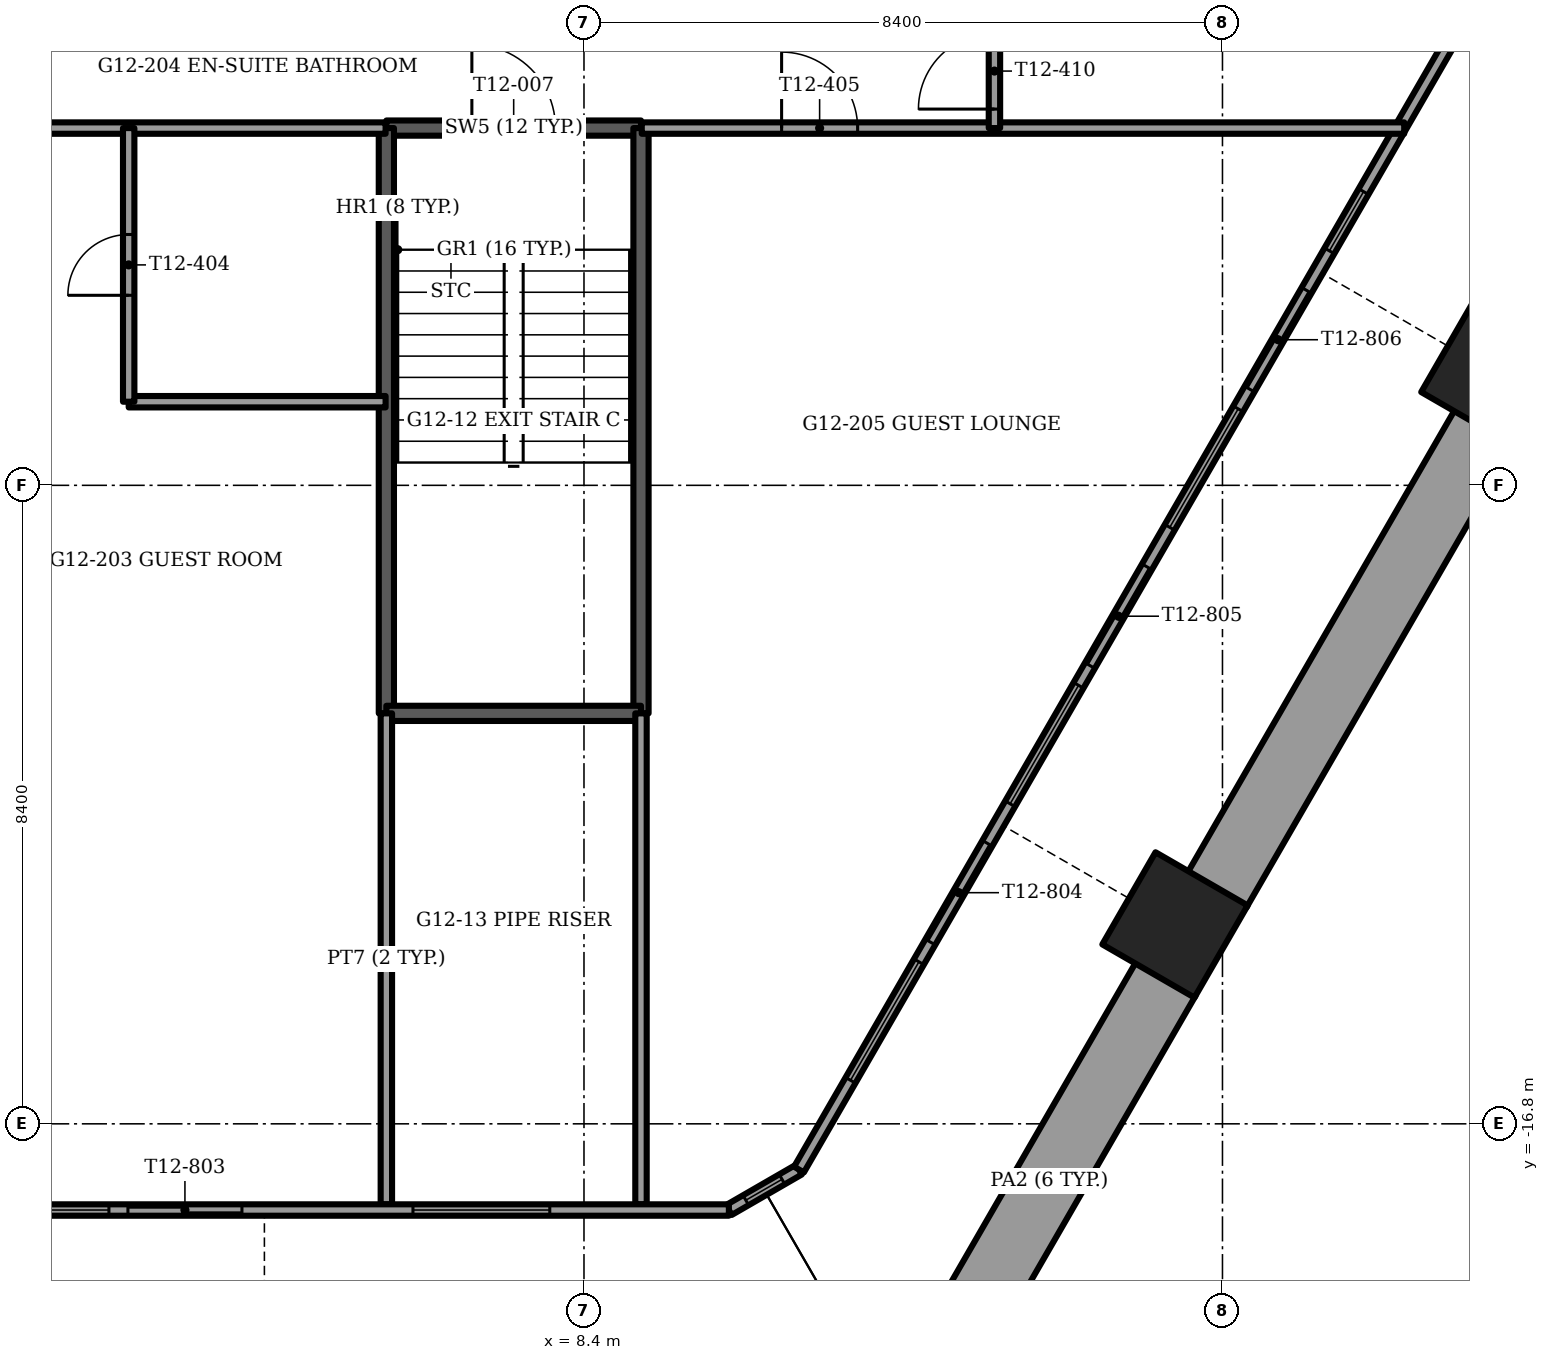
"""IFC4 building model, lengths in metres.
Left out: names, types, materials, properties, quantities, classifications, styles, units other than length and angle.
Written with IfcOpenShell. Run it as: python <this file> out.ifc"""

import sys

from ifc_helpers import new_model, si_unit, direction, frame, frame_2d, origin, origin_2d, place, context, subcontext, project, spatial, rectangle, extrude, element, fill, save


model = new_model("IFC4")
c1 = context("Model", 3, precision=1e-05, world=origin(), true_north=direction((0.0, 1.0)))
c2 = subcontext(c1, "Body", "Model", "MODEL_VIEW")
j1 = project(units=[si_unit("LENGTHUNIT", "METRE"), si_unit("PLANEANGLEUNIT", "RADIAN")], contexts=[c1])
p1 = place(None, origin())
s1 = spatial("IfcSite", under=j1, at=p1, CompositionType="ELEMENT")
p2 = place(p1, origin())
s2 = spatial("IfcBuilding", under=s1, at=p2, CompositionType="ELEMENT")
p3 = place(p2, frame((0.0, 0.0, 50.5)))
s3 = spatial("IfcBuildingStorey", under=s2, at=p3, CompositionType="ELEMENT", Elevation=50.5)
for number, where, z_axis, x_axis in (
    (1, (16.175, -14.183, -1.2), (0.0, 0.0, 1.0), (-0.5, -0.866, 0.0)),
    (2, (20.371, -6.917, -1.2), (0.0, 0.0, 1.0), (-0.5, -0.866, 0.0)),
):
    element("IfcColumn", number, at=place(p3, frame(where, z_axis=z_axis, x_axis=x_axis)), inside=s3, PredefinedType="COLUMN", context=c2, shape_type="SweptSolid", body=[
        extrude(rectangle(XDim=1.4, YDim=1.4, at=origin_2d()), origin(), (0.0, 0.0, 1.0), 3.75),
    ])
p4 = place(p3, frame((12.989, -20.203, 0.0), z_axis=(0.0, 0.0, 1.0), x_axis=(0.500007141444, 0.86602128063, 0.0)))
e3 = element("IfcWall", 3, at=p4, inside=s3, PredefinedType="PARAPET", context=c2, shape_type="SweptSolid", body=[
    extrude(rectangle(XDim=6.137, YDim=0.9, at=frame_2d((3.068, 0.0))), origin(), (0.0, 0.0, 1.0), 1.1),
])
p5 = place(p3, frame((16.727, -13.728, 0.0), z_axis=(0.0, 0.0, 1.0), x_axis=(0.499997206141, 0.866027016814, 0.0)))
e4 = element("IfcWall", 4, at=p5, inside=s3, PredefinedType="PARAPET", context=c2, shape_type="SweptSolid", body=[
    extrude(rectangle(XDim=7.051, YDim=0.9, at=frame_2d((3.525, 0.0))), origin(), (0.0, 0.0, 1.0), 1.1),
])
p6 = place(p3, frame((-10.306, -17.934, 0.0), z_axis=(0.0, 0.0, 1.0), x_axis=(1.0, 0.0, 0.0)))
e5 = element("IfcWall", 5, at=p6, inside=s3, PredefinedType="SOLIDWALL", context=c2, shape_type="SweptSolid", body=[
    extrude(rectangle(XDim=20.613, YDim=0.15, at=frame_2d((10.306, 0.0))), origin(), (0.0, 0.0, 1.0), 3.45),
])
p7 = place(p6, frame((4.856, 0.0, 0.15)))
e6 = element("IfcOpeningElement", 6, at=p7, cuts=e5, PredefinedType="OPENING", context=c2, shape_type="SweptSolid", body=[
    extrude(rectangle(XDim=0.9, YDim=2.85, at=frame_2d((0.45, 1.425))), frame((0.0, 0.075, 0.0), z_axis=(0.0, -1.0, 0.0), x_axis=(1.0, 0.0, 0.0)), (0.0, 0.0, 1.0), 0.15),
])
p8 = place(p6, frame((2.656, 0.0, 0.15)))
e7 = element("IfcOpeningElement", 7, at=p8, cuts=e5, PredefinedType="OPENING", context=c2, shape_type="SweptSolid", body=[
    extrude(rectangle(XDim=1.5, YDim=2.85, at=frame_2d((0.75, 1.425))), frame((0.0, 0.075, 0.0), z_axis=(0.0, -1.0, 0.0), x_axis=(1.0, 0.0, 0.0)), (0.0, 0.0, 1.0), 0.15),
])
p9 = place(p6, frame((6.406, 0.0, 0.15)))
e8 = element("IfcOpeningElement", 8, at=p9, cuts=e5, PredefinedType="OPENING", context=c2, shape_type="SweptSolid", body=[
    extrude(rectangle(XDim=1.8, YDim=2.85, at=frame_2d((0.9, 1.425))), frame((0.0, 0.075, 0.0), z_axis=(0.0, -1.0, 0.0), x_axis=(1.0, 0.0, 0.0)), (0.0, 0.0, 1.0), 0.15),
])
p10 = place(p6, frame((8.456, 0.0, 0.15)))
e9 = element("IfcOpeningElement", 9, at=p10, cuts=e5, PredefinedType="OPENING", context=c2, shape_type="SweptSolid", body=[
    extrude(rectangle(XDim=1.5, YDim=2.85, at=frame_2d((0.75, 1.425))), frame((0.0, 0.075, 0.0), z_axis=(0.0, -1.0, 0.0), x_axis=(1.0, 0.0, 0.0)), (0.0, 0.0, 1.0), 0.15),
])
p11 = place(p6, frame((10.656, 0.0, 0.15)))
e10 = element("IfcOpeningElement", 10, at=p11, cuts=e5, PredefinedType="OPENING", context=c2, shape_type="SweptSolid", body=[
    extrude(rectangle(XDim=1.8, YDim=2.85, at=frame_2d((0.9, 1.425))), frame((0.0, 0.075, 0.0), z_axis=(0.0, -1.0, 0.0), x_axis=(1.0, 0.0, 0.0)), (0.0, 0.0, 1.0), 0.15),
])
p12 = place(p6, frame((12.706, 0.0, 0.0)))
e11 = element("IfcOpeningElement", 11, at=p12, cuts=e5, PredefinedType="OPENING", context=c2, shape_type="SweptSolid", body=[
    extrude(rectangle(XDim=1.5, YDim=2.4, at=frame_2d((0.75, 1.2))), frame((0.0, 0.075, 0.0), z_axis=(0.0, -1.0, 0.0), x_axis=(1.0, 0.0, 0.0)), (0.0, 0.0, 1.0), 0.15),
])
p13 = place(p6, frame((16.456, 0.0, 0.15)))
e12 = element("IfcOpeningElement", 12, at=p13, cuts=e5, PredefinedType="OPENING", context=c2, shape_type="SweptSolid", body=[
    extrude(rectangle(XDim=1.8, YDim=2.85, at=frame_2d((0.9, 1.425))), frame((0.0, 0.075, 0.0), z_axis=(0.0, -1.0, 0.0), x_axis=(1.0, 0.0, 0.0)), (0.0, 0.0, 1.0), 0.15),
])
p14 = place(p3, frame((11.229, -17.402, 0.0), z_axis=(0.0, 0.0, 1.0), x_axis=(0.500004426522, 0.866022848116, 0.0)))
e13 = element("IfcWall", 13, at=p14, inside=s3, PredefinedType="SOLIDWALL", context=c2, shape_type="SweptSolid", body=[
    extrude(rectangle(XDim=18.912, YDim=0.15, at=frame_2d((9.456, 0.0))), origin(), (0.0, 0.0, 1.0), 3.45),
])
p15 = place(p14, frame((1.356, 0.0, 0.15)))
e14 = element("IfcOpeningElement", 14, at=p15, cuts=e13, PredefinedType="OPENING", context=c2, shape_type="SweptSolid", body=[
    extrude(rectangle(XDim=1.8, YDim=2.85, at=frame_2d((0.9, 1.425))), frame((0.0, 0.075, 0.0), z_axis=(0.0, -1.0, 0.0), x_axis=(1.0, 0.0, 0.0)), (0.0, 0.0, 1.0), 0.15),
])
p16 = place(p14, frame((3.456, 0.0, 0.0)))
e15 = element("IfcOpeningElement", 15, at=p16, cuts=e13, PredefinedType="OPENING", context=c2, shape_type="SweptSolid", body=[
    extrude(rectangle(XDim=1.5, YDim=2.4, at=frame_2d((0.75, 1.2))), frame((0.0, 0.075, 0.0), z_axis=(0.0, -1.0, 0.0), x_axis=(1.0, 0.0, 0.0)), (0.0, 0.0, 1.0), 0.15),
])
p17 = place(p14, frame((5.556, 0.0, 0.15)))
e16 = element("IfcOpeningElement", 16, at=p17, cuts=e13, PredefinedType="OPENING", context=c2, shape_type="SweptSolid", body=[
    extrude(rectangle(XDim=1.8, YDim=2.85, at=frame_2d((0.9, 1.425))), frame((0.0, 0.075, 0.0), z_axis=(0.0, -1.0, 0.0), x_axis=(1.0, 0.0, 0.0)), (0.0, 0.0, 1.0), 0.15),
])
p18 = place(p14, frame((7.656, 0.0, 0.0)))
e17 = element("IfcOpeningElement", 17, at=p18, cuts=e13, PredefinedType="OPENING", context=c2, shape_type="SweptSolid", body=[
    extrude(rectangle(XDim=1.5, YDim=2.4, at=frame_2d((0.75, 1.2))), frame((0.0, 0.075, 0.0), z_axis=(0.0, -1.0, 0.0), x_axis=(1.0, 0.0, 0.0)), (0.0, 0.0, 1.0), 0.15),
])
p19 = place(p14, frame((9.756, 0.0, 0.15)))
e18 = element("IfcOpeningElement", 18, at=p19, cuts=e13, PredefinedType="OPENING", context=c2, shape_type="SweptSolid", body=[
    extrude(rectangle(XDim=1.8, YDim=2.85, at=frame_2d((0.9, 1.425))), frame((0.0, 0.075, 0.0), z_axis=(0.0, -1.0, 0.0), x_axis=(1.0, 0.0, 0.0)), (0.0, 0.0, 1.0), 0.15),
])
p20 = place(p14, frame((11.856, 0.0, 0.0)))
e19 = element("IfcOpeningElement", 19, at=p20, cuts=e13, PredefinedType="OPENING", context=c2, shape_type="SweptSolid", body=[
    extrude(rectangle(XDim=1.5, YDim=2.4, at=frame_2d((0.75, 1.2))), frame((0.0, 0.075, 0.0), z_axis=(0.0, -1.0, 0.0), x_axis=(1.0, 0.0, 0.0)), (0.0, 0.0, 1.0), 0.15),
])
p21 = place(p14, frame((13.956, 0.0, 0.15)))
e20 = element("IfcOpeningElement", 20, at=p21, cuts=e13, PredefinedType="OPENING", context=c2, shape_type="SweptSolid", body=[
    extrude(rectangle(XDim=0.9, YDim=2.85, at=frame_2d((0.45, 1.425))), frame((0.0, 0.075, 0.0), z_axis=(0.0, -1.0, 0.0), x_axis=(1.0, 0.0, 0.0)), (0.0, 0.0, 1.0), 0.15),
])
p22 = place(p3, frame((10.306, -17.934, 0.0), z_axis=(0.0, 0.0, 1.0), x_axis=(0.865990848561, 0.500059846627, 0.0)))
e21 = element("IfcWall", 21, at=p22, inside=s3, PredefinedType="SOLIDWALL", context=c2, shape_type="SweptSolid", body=[
    extrude(rectangle(XDim=1.065, YDim=0.15, at=frame_2d((0.532, 0.0))), origin(), (0.0, 0.0, 1.0), 3.45),
])
p23 = place(p22, frame((0.258, 0.0, 0.15)))
e22 = element("IfcOpeningElement", 22, at=p23, cuts=e21, PredefinedType="OPENING", context=c2, shape_type="SweptSolid", body=[
    extrude(rectangle(XDim=0.55, YDim=2.85, at=frame_2d((0.275, 1.425))), frame((0.0, 0.075, 0.0), z_axis=(0.0, -1.0, 0.0), x_axis=(1.0, 0.0, 0.0)), (0.0, 0.0, 1.0), 0.15),
])
p24 = place(p3, frame((5.8, -3.7, -0.3), z_axis=(0.0, 0.0, 1.0), x_axis=(1.0, 0.0, 0.0)))
e23 = element("IfcWall", 23, at=p24, inside=s3, PredefinedType="SOLIDWALL", context=c2, shape_type="SweptSolid", body=[
    extrude(rectangle(XDim=3.35, YDim=0.2, at=frame_2d((1.675, 0.0))), origin(), (0.0, 0.0, 1.0), 3.75),
])
p25 = place(p24, frame((1.125, 0.0, 0.0)))
e24 = element("IfcOpeningElement", 24, at=p25, cuts=e23, PredefinedType="OPENING", context=c2, shape_type="SweptSolid", body=[
    extrude(rectangle(XDim=1.1, YDim=2.1, at=frame_2d((0.55, 1.05))), frame((0.0, 0.1, 0.0), z_axis=(0.0, -1.0, 0.0), x_axis=(1.0, 0.0, 0.0)), (0.0, 0.0, 1.0), 0.2),
])
for number, where, z_axis, x_axis in (
    (25, (5.8, -3.7, -0.3), (0.0, 0.0, 1.0), (0.0, -1.0, 0.0)),
    (26, (9.15, -3.7, -0.3), (0.0, 0.0, 1.0), (0.0, -1.0, 0.0)),
):
    element("IfcWall", number, at=place(p3, frame(where, z_axis=z_axis, x_axis=x_axis)), inside=s3, PredefinedType="SOLIDWALL", context=c2, shape_type="SweptSolid", body=[
        extrude(rectangle(XDim=7.7, YDim=0.2, at=frame_2d((3.85, 0.0))), origin(), (0.0, 0.0, 1.0), 3.75),
    ])
p26 = place(p3, frame((5.8, -11.4, -0.3), z_axis=(0.0, 0.0, 1.0), x_axis=(1.0, 0.0, 0.0)))
e27 = element("IfcWall", 27, at=p26, inside=s3, PredefinedType="SOLIDWALL", context=c2, shape_type="SweptSolid", body=[
    extrude(rectangle(XDim=3.35, YDim=0.2, at=frame_2d((1.675, 0.0))), origin(), (0.0, 0.0, 1.0), 3.75),
])
for number, where, z_axis, x_axis in (
    (28, (5.8, -11.4, 0.0), (0.0, 0.0, 1.0), (0.0, -1.0, 0.0)),
    (29, (9.15, -11.4, 0.0), (0.0, 0.0, 1.0), (0.0, -1.0, 0.0)),
):
    element("IfcWall", number, at=place(p3, frame(where, z_axis=z_axis, x_axis=x_axis)), inside=s3, PredefinedType="PARTITIONING", context=c2, shape_type="SweptSolid", body=[
        extrude(rectangle(XDim=6.459, YDim=0.15, at=frame_2d((3.229, 0.0))), origin(), (0.0, 0.0, 1.0), 3.45),
    ])
p27 = place(p3, frame((2.41, -7.3, 0.0), z_axis=(0.0, 0.0, 1.0), x_axis=(1.0, 0.0, 0.0)))
e30 = element("IfcWall", 30, at=p27, inside=s3, PredefinedType="PARTITIONING", context=c2, shape_type="SweptSolid", body=[
    extrude(rectangle(XDim=3.38, YDim=0.15, at=frame_2d((1.69, 0.0))), origin(), (0.0, 0.0, 1.0), 3.45),
])
p28 = place(p3, frame((-5.79, -3.7, 0.0), z_axis=(0.0, 0.0, 1.0), x_axis=(1.0, 0.0, 0.0)))
e31 = element("IfcWall", 31, at=p28, inside=s3, PredefinedType="PARTITIONING", context=c2, shape_type="SweptSolid", body=[
    extrude(rectangle(XDim=11.58, YDim=0.15, at=frame_2d((5.79, 0.0))), origin(), (0.0, 0.0, 1.0), 3.45),
])
p29 = place(p28, frame((2.39, 0.0, 0.0)))
e32 = element("IfcOpeningElement", 32, at=p29, cuts=e31, PredefinedType="OPENING", context=c2, shape_type="SweptSolid", body=[
    extrude(rectangle(XDim=1.0, YDim=2.1, at=frame_2d((0.5, 1.05))), frame((0.0, 0.075, 0.0), z_axis=(0.0, -1.0, 0.0), x_axis=(1.0, 0.0, 0.0)), (0.0, 0.0, 1.0), 0.15),
])
p30 = place(p28, frame((6.04, 0.0, 0.0)))
e33 = element("IfcOpeningElement", 33, at=p30, cuts=e31, PredefinedType="OPENING", context=c2, shape_type="SweptSolid", body=[
    extrude(rectangle(XDim=1.0, YDim=2.1, at=frame_2d((0.5, 1.05))), frame((0.0, 0.075, 0.0), z_axis=(0.0, -1.0, 0.0), x_axis=(1.0, 0.0, 0.0)), (0.0, 0.0, 1.0), 0.15),
])
p31 = place(p3, frame((9.16, -3.7, 0.0), z_axis=(0.0, 0.0, 1.0), x_axis=(1.0, 0.0, 0.0)))
e34 = element("IfcWall", 34, at=p31, inside=s3, PredefinedType="PARTITIONING", context=c2, shape_type="SweptSolid", body=[
    extrude(rectangle(XDim=10.031, YDim=0.15, at=frame_2d((5.016, 0.0))), origin(), (0.0, 0.0, 1.0), 3.45),
])
p32 = place(p31, frame((1.84, 0.0, 0.0)))
e35 = element("IfcOpeningElement", 35, at=p32, cuts=e34, PredefinedType="OPENING", context=c2, shape_type="SweptSolid", body=[
    extrude(rectangle(XDim=1.0, YDim=2.1, at=frame_2d((0.5, 1.05))), frame((0.0, 0.075, 0.0), z_axis=(0.0, -1.0, 0.0), x_axis=(1.0, 0.0, 0.0)), (0.0, 0.0, 1.0), 0.15),
])
p33 = place(p3, frame((13.8, -3.7, 0.0), z_axis=(0.0, 0.0, 1.0), x_axis=(0.0, 1.0, 0.0)))
e36 = element("IfcWall", 36, at=p33, inside=s3, PredefinedType="PARTITIONING", context=c2, shape_type="SweptSolid", body=[
    extrude(rectangle(XDim=15.756, YDim=0.15, at=frame_2d((7.878, 0.0))), origin(), (0.0, 0.0, 1.0), 3.45),
])
p34 = place(p33, frame((0.25, 0.0, 0.0)))
e37 = element("IfcOpeningElement", 37, at=p34, cuts=e36, PredefinedType="OPENING", context=c2, shape_type="SweptSolid", body=[
    extrude(rectangle(XDim=1.0, YDim=2.1, at=frame_2d((0.5, 1.05))), frame((0.0, 0.075, 0.0), z_axis=(0.0, -1.0, 0.0), x_axis=(1.0, 0.0, 0.0)), (0.0, 0.0, 1.0), 0.15),
])
p35 = place(p33, frame((5.275, 0.0, 0.0)))
e38 = element("IfcOpeningElement", 38, at=p35, cuts=e36, PredefinedType="OPENING", context=c2, shape_type="SweptSolid", body=[
    extrude(rectangle(XDim=1.0, YDim=2.1, at=frame_2d((0.5, 1.05))), frame((0.0, 0.075, 0.0), z_axis=(0.0, -1.0, 0.0), x_axis=(1.0, 0.0, 0.0)), (0.0, 0.0, 1.0), 0.15),
])
p36 = place(p33, frame((10.933, 0.0, 0.0)))
e39 = element("IfcOpeningElement", 39, at=p36, cuts=e36, PredefinedType="OPENING", context=c2, shape_type="SweptSolid", body=[
    extrude(rectangle(XDim=1.0, YDim=2.1, at=frame_2d((0.5, 1.05))), frame((0.0, 0.075, 0.0), z_axis=(0.0, -1.0, 0.0), x_axis=(1.0, 0.0, 0.0)), (0.0, 0.0, 1.0), 0.15),
])
p37 = place(p3, frame((2.41, -7.3, 0.0), z_axis=(0.0, 0.0, 1.0), x_axis=(0.0, 1.0, 0.0)))
e40 = element("IfcWall", 40, at=p37, inside=s3, PredefinedType="PARTITIONING", context=c2, shape_type="SweptSolid", body=[
    extrude(rectangle(XDim=3.6, YDim=0.15, at=frame_2d((1.8, 0.0))), origin(), (0.0, 0.0, 1.0), 3.45),
])
p38 = place(p37, frame((1.4, 0.0, 0.0)))
e41 = element("IfcOpeningElement", 41, at=p38, cuts=e40, PredefinedType="OPENING", context=c2, shape_type="SweptSolid", body=[
    extrude(rectangle(XDim=0.8, YDim=2.1, at=frame_2d((0.4, 1.05))), frame((0.0, 0.075, 0.0), z_axis=(0.0, -1.0, 0.0), x_axis=(1.0, 0.0, 0.0)), (0.0, 0.0, 1.0), 0.15),
])
p39 = place(p11, origin())
e42 = element("IfcWindow", 42, at=p39, inside=s3, PartitioningType="SINGLE_PANEL", PredefinedType="WINDOW", context=c2, shape_type="SweptSolid", body=[
    extrude(rectangle(XDim=1.8, YDim=2.85, at=frame_2d((0.9, 1.425))), frame((0.0, 0.03, 0.0), z_axis=(0.0, -1.0, 0.0), x_axis=(1.0, 0.0, 0.0)), (0.0, 0.0, 1.0), 0.06),
])
fill(e10, e42)
p40 = place(p12, origin())
e43 = element("IfcDoor", 43, at=p40, inside=s3, OperationType="SLIDING_TO_LEFT", PredefinedType="DOOR", context=c2, shape_type="SweptSolid", body=[
    extrude(rectangle(XDim=1.5, YDim=2.4, at=frame_2d((0.75, 1.2))), frame((0.0, 0.025, 0.0), z_axis=(0.0, -1.0, 0.0), x_axis=(1.0, 0.0, 0.0)), (0.0, 0.0, 1.0), 0.05),
])
fill(e11, e43)
p41 = place(p13, origin())
e44 = element("IfcWindow", 44, at=p41, inside=s3, PartitioningType="SINGLE_PANEL", PredefinedType="WINDOW", context=c2, shape_type="SweptSolid", body=[
    extrude(rectangle(XDim=1.8, YDim=2.85, at=frame_2d((0.9, 1.425))), frame((0.0, 0.03, 0.0), z_axis=(0.0, -1.0, 0.0), x_axis=(1.0, 0.0, 0.0)), (0.0, 0.0, 1.0), 0.06),
])
fill(e12, e44)
p42 = place(p15, origin())
e45 = element("IfcWindow", 45, at=p42, inside=s3, PartitioningType="SINGLE_PANEL", PredefinedType="WINDOW", context=c2, shape_type="SweptSolid", body=[
    extrude(rectangle(XDim=1.8, YDim=2.85, at=frame_2d((0.9, 1.425))), frame((0.0, 0.03, 0.0), z_axis=(0.0, -1.0, 0.0), x_axis=(1.0, 0.0, 0.0)), (0.0, 0.0, 1.0), 0.06),
])
fill(e14, e45)
p43 = place(p16, origin())
e46 = element("IfcDoor", 46, at=p43, inside=s3, OperationType="SLIDING_TO_LEFT", PredefinedType="DOOR", context=c2, shape_type="SweptSolid", body=[
    extrude(rectangle(XDim=1.5, YDim=2.4, at=frame_2d((0.75, 1.2))), frame((0.0, 0.025, 0.0), z_axis=(0.0, -1.0, 0.0), x_axis=(1.0, 0.0, 0.0)), (0.0, 0.0, 1.0), 0.05),
])
fill(e15, e46)
p44 = place(p17, origin())
e47 = element("IfcWindow", 47, at=p44, inside=s3, PartitioningType="SINGLE_PANEL", PredefinedType="WINDOW", context=c2, shape_type="SweptSolid", body=[
    extrude(rectangle(XDim=1.8, YDim=2.85, at=frame_2d((0.9, 1.425))), frame((0.0, 0.03, 0.0), z_axis=(0.0, -1.0, 0.0), x_axis=(1.0, 0.0, 0.0)), (0.0, 0.0, 1.0), 0.06),
])
fill(e16, e47)
p45 = place(p18, origin())
e48 = element("IfcDoor", 48, at=p45, inside=s3, OperationType="SLIDING_TO_RIGHT", PredefinedType="DOOR", context=c2, shape_type="SweptSolid", body=[
    extrude(rectangle(XDim=1.5, YDim=2.4, at=frame_2d((0.75, 1.2))), frame((0.0, 0.025, 0.0), z_axis=(0.0, -1.0, 0.0), x_axis=(1.0, 0.0, 0.0)), (0.0, 0.0, 1.0), 0.05),
])
fill(e17, e48)
p46 = place(p19, origin())
e49 = element("IfcWindow", 49, at=p46, inside=s3, PartitioningType="SINGLE_PANEL", PredefinedType="WINDOW", context=c2, shape_type="SweptSolid", body=[
    extrude(rectangle(XDim=1.8, YDim=2.85, at=frame_2d((0.9, 1.425))), frame((0.0, 0.03, 0.0), z_axis=(0.0, -1.0, 0.0), x_axis=(1.0, 0.0, 0.0)), (0.0, 0.0, 1.0), 0.06),
])
fill(e18, e49)
p47 = place(p20, origin())
e50 = element("IfcDoor", 50, at=p47, inside=s3, OperationType="SLIDING_TO_LEFT", PredefinedType="DOOR", context=c2, shape_type="SweptSolid", body=[
    extrude(rectangle(XDim=1.5, YDim=2.4, at=frame_2d((0.75, 1.2))), frame((0.0, 0.025, 0.0), z_axis=(0.0, -1.0, 0.0), x_axis=(1.0, 0.0, 0.0)), (0.0, 0.0, 1.0), 0.05),
])
fill(e19, e50)
p48 = place(p21, origin())
e51 = element("IfcWindow", 51, at=p48, inside=s3, PartitioningType="SINGLE_PANEL", PredefinedType="WINDOW", context=c2, shape_type="SweptSolid", body=[
    extrude(rectangle(XDim=0.9, YDim=2.85, at=frame_2d((0.45, 1.425))), frame((0.0, 0.03, 0.0), z_axis=(0.0, -1.0, 0.0), x_axis=(1.0, 0.0, 0.0)), (0.0, 0.0, 1.0), 0.06),
])
fill(e20, e51)
p49 = place(p23, origin())
e52 = element("IfcWindow", 52, at=p49, inside=s3, PartitioningType="SINGLE_PANEL", PredefinedType="WINDOW", context=c2, shape_type="SweptSolid", body=[
    extrude(rectangle(XDim=0.55, YDim=2.85, at=frame_2d((0.275, 1.425))), frame((0.0, 0.03, 0.0), z_axis=(0.0, -1.0, 0.0), x_axis=(1.0, 0.0, 0.0)), (0.0, 0.0, 1.0), 0.06),
])
fill(e22, e52)
p50 = place(p25, origin())
e53 = element("IfcDoor", 53, at=p50, inside=s3, OperationType="SINGLE_SWING_LEFT", PredefinedType="DOOR", context=c2, shape_type="SweptSolid", body=[
    extrude(rectangle(XDim=1.1, YDim=2.1, at=frame_2d((0.55, 1.05))), frame((0.0, 0.025, 0.0), z_axis=(0.0, -1.0, 0.0), x_axis=(1.0, 0.0, 0.0)), (0.0, 0.0, 1.0), 0.05),
])
fill(e24, e53)
p51 = place(p38, origin())
e54 = element("IfcDoor", 54, at=p51, inside=s3, OperationType="SINGLE_SWING_RIGHT", PredefinedType="DOOR", context=c2, shape_type="SweptSolid", body=[
    extrude(rectangle(XDim=0.8, YDim=2.1, at=frame_2d((0.4, 1.05))), frame((0.0, 0.025, 0.0), z_axis=(0.0, -1.0, 0.0), x_axis=(1.0, 0.0, 0.0)), (0.0, 0.0, 1.0), 0.05),
])
fill(e41, e54)
p52 = place(p32, origin())
e55 = element("IfcDoor", 55, at=p52, inside=s3, OperationType="SINGLE_SWING_LEFT", PredefinedType="DOOR", context=c2, shape_type="SweptSolid", body=[
    extrude(rectangle(XDim=1.0, YDim=2.1, at=frame_2d((0.5, 1.05))), frame((0.0, 0.025, 0.0), z_axis=(0.0, -1.0, 0.0), x_axis=(1.0, 0.0, 0.0)), (0.0, 0.0, 1.0), 0.05),
])
fill(e35, e55)
p53 = place(p34, origin())
e56 = element("IfcDoor", 56, at=p53, inside=s3, OperationType="SINGLE_SWING_LEFT", PredefinedType="DOOR", context=c2, shape_type="SweptSolid", body=[
    extrude(rectangle(XDim=1.0, YDim=2.1, at=frame_2d((0.5, 1.05))), frame((0.0, 0.025, 0.0), z_axis=(0.0, -1.0, 0.0), x_axis=(1.0, 0.0, 0.0)), (0.0, 0.0, 1.0), 0.05),
])
fill(e37, e56)
save(model, sys.argv[1])
